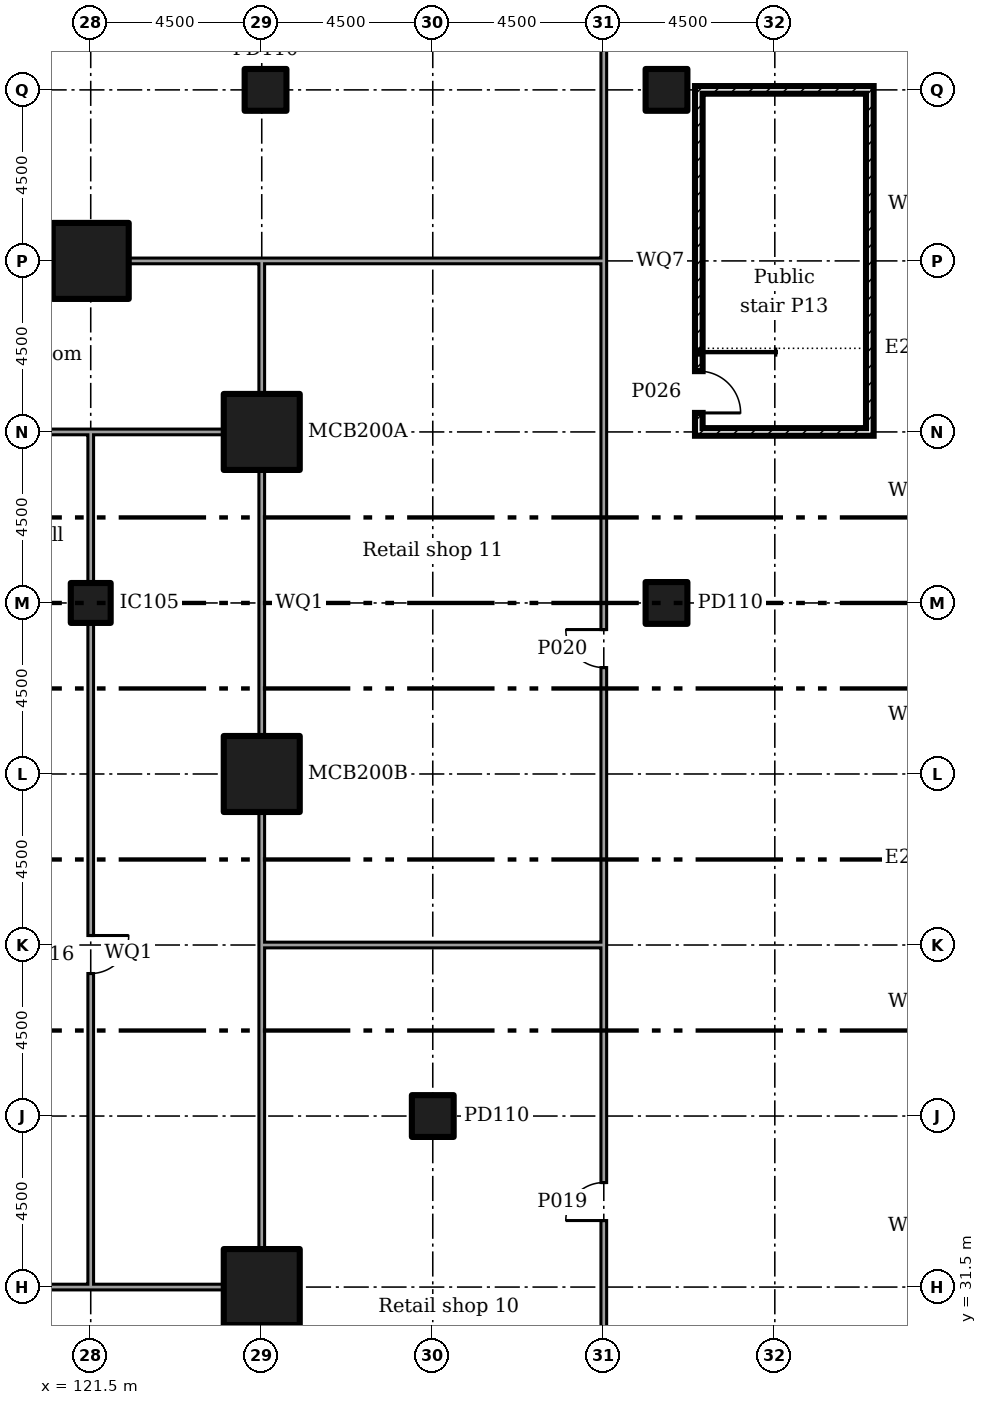
"""IFC4 building model, lengths in metres.
Left out: names, types, materials, properties, quantities, classifications, styles, units other than length and angle.
Written with IfcOpenShell. Run it as: python <this file> out.ifc"""

import sys

from ifc_helpers import new_model, si_unit, direction, frame, frame_2d, origin, origin_2d, place, context, subcontext, project, spatial, rectangle, extrude, element, fill, save


model = new_model("IFC4")
c1 = context("Model", 3, precision=1e-05, world=origin(), true_north=direction((0.0, 1.0)))
c2 = subcontext(c1, "Body", "Model", "MODEL_VIEW")
j1 = project(units=[si_unit("LENGTHUNIT", "METRE"), si_unit("PLANEANGLEUNIT", "RADIAN")], contexts=[c1])
p1 = place(None, origin())
s1 = spatial("IfcSite", under=j1, at=p1, CompositionType="ELEMENT")
p2 = place(p1, origin())
s2 = spatial("IfcBuilding", under=s1, at=p2, CompositionType="ELEMENT")
p3 = place(p2, frame((0.0, 0.0, 6.0)))
s3 = spatial("IfcBuildingStorey", under=s2, at=p3, CompositionType="ELEMENT", Elevation=6.0)
for number, where in (
    (1, (121.5, 58.5, 0.0)),
    (2, (126.0, 31.5, 0.0)),
    (3, (126.0, 45.0, 0.0)),
    (4, (126.0, 54.0, 0.0)),
):
    element("IfcColumn", number, at=place(p3, frame(where)), inside=s3, PredefinedType="COLUMN", context=c2, shape_type="SweptSolid", body=[
        extrude(rectangle(XDim=2.0, YDim=2.0, at=origin_2d()), origin(), (0.0, 0.0, 1.0), 5.5),
    ])
p4 = place(p3, frame((121.5, 49.5, 0.0)))
e5 = element("IfcColumn", 5, at=p4, inside=s3, PredefinedType="COLUMN", context=c2, shape_type="SweptSolid", body=[
    extrude(rectangle(XDim=1.05, YDim=1.05, at=origin_2d()), origin(), (0.0, 0.0, 1.0), 5.5),
])
for number, where in (
    (6, (126.1, 63.0, 0.0)),
    (7, (130.5, 36.0, 0.0)),
    (8, (136.65, 49.5, 0.0)),
    (9, (136.65, 63.0, 0.0)),
):
    element("IfcColumn", number, at=place(p3, frame(where)), inside=s3, PredefinedType="COLUMN", context=c2, shape_type="SweptSolid", body=[
        extrude(rectangle(XDim=1.1, YDim=1.1, at=origin_2d()), origin(), (0.0, 0.0, 1.0), 5.5),
    ])
p5 = place(p3, frame((135.0, 27.0, 0.0), z_axis=(0.0, 0.0, 1.0), x_axis=(0.0, 1.0, 0.0)))
e10 = element("IfcWall", 10, at=p5, inside=s3, PredefinedType="PARTITIONING", context=c2, shape_type="SweptSolid", body=[
    extrude(rectangle(XDim=13.575, YDim=0.15, at=frame_2d((6.788, 0.0))), origin(), (0.0, 0.0, 1.0), 5.05),
])
p6 = place(p5, frame((6.25, 0.0, 0.0)))
e11 = element("IfcOpeningElement", 11, at=p6, cuts=e10, PredefinedType="OPENING", context=c2, shape_type="SweptSolid", body=[
    extrude(rectangle(XDim=1.0, YDim=2.1, at=frame_2d((0.5, 1.05))), frame((0.0, 0.085, 0.0), z_axis=(0.0, -1.0, 0.0), x_axis=(1.0, 0.0, 0.0)), (0.0, 0.0, 1.0), 0.17),
])
p7 = place(p3, frame((135.0, 40.5, 0.0), z_axis=(0.0, 0.0, 1.0), x_axis=(0.0, 1.0, 0.0)))
e12 = element("IfcWall", 12, at=p7, inside=s3, PredefinedType="PARTITIONING", context=c2, shape_type="SweptSolid", body=[
    extrude(rectangle(XDim=18.075, YDim=0.15, at=frame_2d((9.038, 0.0))), origin(), (0.0, 0.0, 1.0), 5.05),
])
p8 = place(p7, frame((7.3, 0.0, 0.0)))
e13 = element("IfcOpeningElement", 13, at=p8, cuts=e12, PredefinedType="OPENING", context=c2, shape_type="SweptSolid", body=[
    extrude(rectangle(XDim=1.0, YDim=2.1, at=frame_2d((0.5, 1.05))), frame((0.0, 0.085, 0.0), z_axis=(0.0, -1.0, 0.0), x_axis=(1.0, 0.0, 0.0)), (0.0, 0.0, 1.0), 0.17),
])
p9 = place(p3, frame((135.0, 58.5, 0.0), z_axis=(0.0, 0.0, 1.0), x_axis=(0.0, 1.0, 0.0)))
e14 = element("IfcWall", 14, at=p9, inside=s3, PredefinedType="PARTITIONING", context=c2, shape_type="SweptSolid", body=[
    extrude(rectangle(XDim=22.5, YDim=0.15, at=frame_2d((11.25, 0.0))), origin(), (0.0, 0.0, 1.0), 5.05),
])
p10 = place(p9, frame((10.75, 0.0, 0.0)))
e15 = element("IfcOpeningElement", 15, at=p10, cuts=e14, PredefinedType="OPENING", context=c2, shape_type="SweptSolid", body=[
    extrude(rectangle(XDim=1.0, YDim=2.1, at=frame_2d((0.5, 1.05))), frame((0.0, 0.085, 0.0), z_axis=(0.0, -1.0, 0.0), x_axis=(1.0, 0.0, 0.0)), (0.0, 0.0, 1.0), 0.17),
])
p11 = place(p3, frame((137.5, 53.9, 0.0), z_axis=(0.0, 0.0, 1.0), x_axis=(0.0, 1.0, 0.0)))
e16 = element("IfcWall", 16, at=p11, inside=s3, PredefinedType="SOLIDWALL", context=c2, shape_type="SweptSolid", body=[
    extrude(rectangle(XDim=9.2, YDim=0.2, at=frame_2d((4.6, 0.0))), origin(), (0.0, 0.0, 1.0), 5.05),
])
p12 = place(p11, frame((0.6, 0.0, 0.0)))
e17 = element("IfcOpeningElement", 17, at=p12, cuts=e16, PredefinedType="OPENING", context=c2, shape_type="SweptSolid", body=[
    extrude(rectangle(XDim=1.1, YDim=2.1, at=frame_2d((0.55, 1.05))), frame((0.0, 0.11, 0.0), z_axis=(0.0, -1.0, 0.0), x_axis=(1.0, 0.0, 0.0)), (0.0, 0.0, 1.0), 0.22),
])
p13 = place(p3, frame((142.0, 53.9, 0.0), z_axis=(0.0, 0.0, 1.0), x_axis=(0.0, 1.0, 0.0)))
e18 = element("IfcWall", 18, at=p13, inside=s3, PredefinedType="SOLIDWALL", context=c2, shape_type="SweptSolid", body=[
    extrude(rectangle(XDim=9.2, YDim=0.2, at=frame_2d((4.6, 0.0))), origin(), (0.0, 0.0, 1.0), 5.05),
])
for number, where in (
    (19, (137.6, 54.0, 0.0)),
    (20, (137.6, 63.0, 0.0)),
):
    element("IfcWall", number, at=place(p3, frame(where)), inside=s3, PredefinedType="SOLIDWALL", context=c2, shape_type="SweptSolid", body=[
        extrude(rectangle(XDim=4.3, YDim=0.2, at=frame_2d((2.15, 0.0))), origin(), (0.0, 0.0, 1.0), 5.05),
    ])
p14 = place(p3, frame((117.52, 31.5, 0.0)))
e21 = element("IfcWall", 21, at=p14, inside=s3, PredefinedType="PARTITIONING", context=c2, shape_type="SweptSolid", body=[
    extrude(rectangle(XDim=4.055, YDim=0.15, at=frame_2d((2.027, 0.0))), origin(), (0.0, 0.0, 1.0), 5.05),
])
p15 = place(p3, frame((104.02, 54.0, 0.0)))
e22 = element("IfcWall", 22, at=p15, inside=s3, PredefinedType="PARTITIONING", context=c2, shape_type="SweptSolid", body=[
    extrude(rectangle(XDim=17.555, YDim=0.15, at=frame_2d((8.777, 0.0))), origin(), (0.0, 0.0, 1.0), 5.05),
])
p16 = place(p15, frame((8.25, 0.0, 0.0)))
e23 = element("IfcOpeningElement", 23, at=p16, cuts=e22, PredefinedType="OPENING", context=c2, shape_type="SweptSolid", body=[
    extrude(rectangle(XDim=1.0, YDim=2.1, at=frame_2d((0.5, 1.05))), frame((0.0, 0.085, 0.0), z_axis=(0.0, -1.0, 0.0), x_axis=(1.0, 0.0, 0.0)), (0.0, 0.0, 1.0), 0.17),
])
p17 = place(p3, frame((121.5, 31.575, 0.0), z_axis=(0.0, 0.0, 1.0), x_axis=(0.0, 1.0, 0.0)))
e24 = element("IfcWall", 24, at=p17, inside=s3, PredefinedType="PARTITIONING", context=c2, shape_type="SweptSolid", body=[
    extrude(rectangle(XDim=17.405, YDim=0.15, at=frame_2d((8.703, 0.0))), origin(), (0.0, 0.0, 1.0), 5.05),
])
p18 = place(p17, frame((8.175, 0.0, 0.0)))
e25 = element("IfcOpeningElement", 25, at=p18, cuts=e24, PredefinedType="OPENING", context=c2, shape_type="SweptSolid", body=[
    extrude(rectangle(XDim=1.0, YDim=2.1, at=frame_2d((0.5, 1.05))), frame((0.0, 0.085, 0.0), z_axis=(0.0, -1.0, 0.0), x_axis=(1.0, 0.0, 0.0)), (0.0, 0.0, 1.0), 0.17),
])
p19 = place(p3, frame((121.5, 50.02, 0.0), z_axis=(0.0, 0.0, 1.0), x_axis=(0.0, 1.0, 0.0)))
e26 = element("IfcWall", 26, at=p19, inside=s3, PredefinedType="PARTITIONING", context=c2, shape_type="SweptSolid", body=[
    extrude(rectangle(XDim=3.905, YDim=0.15, at=frame_2d((1.953, 0.0))), origin(), (0.0, 0.0, 1.0), 5.05),
])
p20 = place(p3, frame((121.5, 31.5, 0.0)))
e27 = element("IfcWall", 27, at=p20, inside=s3, PredefinedType="PARTITIONING", context=c2, shape_type="SweptSolid", body=[
    extrude(rectangle(XDim=3.505, YDim=0.15, at=frame_2d((1.752, 0.0))), origin(), (0.0, 0.0, 1.0), 5.05),
])
p21 = place(p3, frame((126.0, 27.075, 0.0), z_axis=(0.0, 0.0, 1.0), x_axis=(0.0, 1.0, 0.0)))
e28 = element("IfcWall", 28, at=p21, inside=s3, PredefinedType="PARTITIONING", context=c2, shape_type="SweptSolid", body=[
    extrude(rectangle(XDim=3.43, YDim=0.15, at=frame_2d((1.715, 0.0))), origin(), (0.0, 0.0, 1.0), 5.05),
])
p22 = place(p3, frame((121.5, 54.0, 0.0)))
e29 = element("IfcWall", 29, at=p22, inside=s3, PredefinedType="PARTITIONING", context=c2, shape_type="SweptSolid", body=[
    extrude(rectangle(XDim=3.505, YDim=0.15, at=frame_2d((1.752, 0.0))), origin(), (0.0, 0.0, 1.0), 5.05),
])
p23 = place(p3, frame((126.0, 54.995, 0.0), z_axis=(0.0, 0.0, 1.0), x_axis=(0.0, 1.0, 0.0)))
e30 = element("IfcWall", 30, at=p23, inside=s3, PredefinedType="PARTITIONING", context=c2, shape_type="SweptSolid", body=[
    extrude(rectangle(XDim=3.58, YDim=0.15, at=frame_2d((1.79, 0.0))), origin(), (0.0, 0.0, 1.0), 5.05),
])
p24 = place(p3, frame((113.495, 58.5, 0.0)))
e31 = element("IfcWall", 31, at=p24, inside=s3, PredefinedType="PARTITIONING", context=c2, shape_type="SweptSolid", body=[
    extrude(rectangle(XDim=7.01, YDim=0.15, at=frame_2d((3.505, 0.0))), origin(), (0.0, 0.0, 1.0), 5.05),
])
p25 = place(p3, frame((122.495, 58.5, 0.0)))
e32 = element("IfcWall", 32, at=p25, inside=s3, PredefinedType="PARTITIONING", context=c2, shape_type="SweptSolid", body=[
    extrude(rectangle(XDim=3.43, YDim=0.15, at=frame_2d((1.715, 0.0))), origin(), (0.0, 0.0, 1.0), 5.05),
])
p26 = place(p3, frame((126.0, 32.495, 0.0), z_axis=(0.0, 0.0, 1.0), x_axis=(0.0, 1.0, 0.0)))
e33 = element("IfcWall", 33, at=p26, inside=s3, PredefinedType="PARTITIONING", context=c2, shape_type="SweptSolid", body=[
    extrude(rectangle(XDim=8.08, YDim=0.15, at=frame_2d((4.04, 0.0))), origin(), (0.0, 0.0, 1.0), 5.05),
])
p27 = place(p3, frame((126.0, 40.5, 0.0), z_axis=(0.0, 0.0, 1.0), x_axis=(0.0, 1.0, 0.0)))
e34 = element("IfcWall", 34, at=p27, inside=s3, PredefinedType="PARTITIONING", context=c2, shape_type="SweptSolid", body=[
    extrude(rectangle(XDim=3.505, YDim=0.15, at=frame_2d((1.752, 0.0))), origin(), (0.0, 0.0, 1.0), 5.05),
])
p28 = place(p3, frame((126.0, 45.995, 0.0), z_axis=(0.0, 0.0, 1.0), x_axis=(0.0, 1.0, 0.0)))
e35 = element("IfcWall", 35, at=p28, inside=s3, PredefinedType="PARTITIONING", context=c2, shape_type="SweptSolid", body=[
    extrude(rectangle(XDim=7.01, YDim=0.15, at=frame_2d((3.505, 0.0))), origin(), (0.0, 0.0, 1.0), 5.05),
])
p29 = place(p3, frame((126.075, 40.5, 0.0)))
e36 = element("IfcWall", 36, at=p29, inside=s3, PredefinedType="PARTITIONING", context=c2, shape_type="SweptSolid", body=[
    extrude(rectangle(XDim=8.85, YDim=0.15, at=frame_2d((4.425, 0.0))), origin(), (0.0, 0.0, 1.0), 5.05),
])
p30 = place(p3, frame((126.0, 58.5, 0.0)))
e37 = element("IfcWall", 37, at=p30, inside=s3, PredefinedType="PARTITIONING", context=c2, shape_type="SweptSolid", body=[
    extrude(rectangle(XDim=8.925, YDim=0.15, at=frame_2d((4.462, 0.0))), origin(), (0.0, 0.0, 1.0), 5.05),
])
p31 = place(p18, frame((1.0, 0.0, 0.0), x_axis=(-1.0, 0.0, 0.0)))
e38 = element("IfcDoor", 38, at=p31, inside=s3, OperationType="SINGLE_SWING_RIGHT", PredefinedType="DOOR", context=c2, shape_type="SweptSolid", body=[
    extrude(rectangle(XDim=1.0, YDim=2.1, at=frame_2d((0.5, 1.05))), frame((0.0, 0.025, 0.0), z_axis=(0.0, -1.0, 0.0), x_axis=(1.0, 0.0, 0.0)), (0.0, 0.0, 1.0), 0.05),
])
fill(e25, e38)
p32 = place(p6, origin())
e39 = element("IfcDoor", 39, at=p32, inside=s3, OperationType="SINGLE_SWING_RIGHT", PredefinedType="DOOR", context=c2, shape_type="SweptSolid", body=[
    extrude(rectangle(XDim=1.0, YDim=2.1, at=frame_2d((0.5, 1.05))), frame((0.0, 0.025, 0.0), z_axis=(0.0, -1.0, 0.0), x_axis=(1.0, 0.0, 0.0)), (0.0, 0.0, 1.0), 0.05),
])
fill(e11, e39)
p33 = place(p8, origin())
e40 = element("IfcDoor", 40, at=p33, inside=s3, OperationType="SINGLE_SWING_LEFT", PredefinedType="DOOR", context=c2, shape_type="SweptSolid", body=[
    extrude(rectangle(XDim=1.0, YDim=2.1, at=frame_2d((0.5, 1.05))), frame((0.0, 0.025, 0.0), z_axis=(0.0, -1.0, 0.0), x_axis=(1.0, 0.0, 0.0)), (0.0, 0.0, 1.0), 0.05),
])
fill(e13, e40)
p34 = place(p12, frame((1.1, 0.0, 0.0), x_axis=(-1.0, 0.0, 0.0)))
e41 = element("IfcDoor", 41, at=p34, inside=s3, OperationType="SINGLE_SWING_LEFT", PredefinedType="DOOR", context=c2, shape_type="SweptSolid", body=[
    extrude(rectangle(XDim=1.1, YDim=2.1, at=frame_2d((0.55, 1.05))), frame((0.0, 0.025, 0.0), z_axis=(0.0, -1.0, 0.0), x_axis=(1.0, 0.0, 0.0)), (0.0, 0.0, 1.0), 0.05),
])
fill(e17, e41)
save(model, sys.argv[1])
